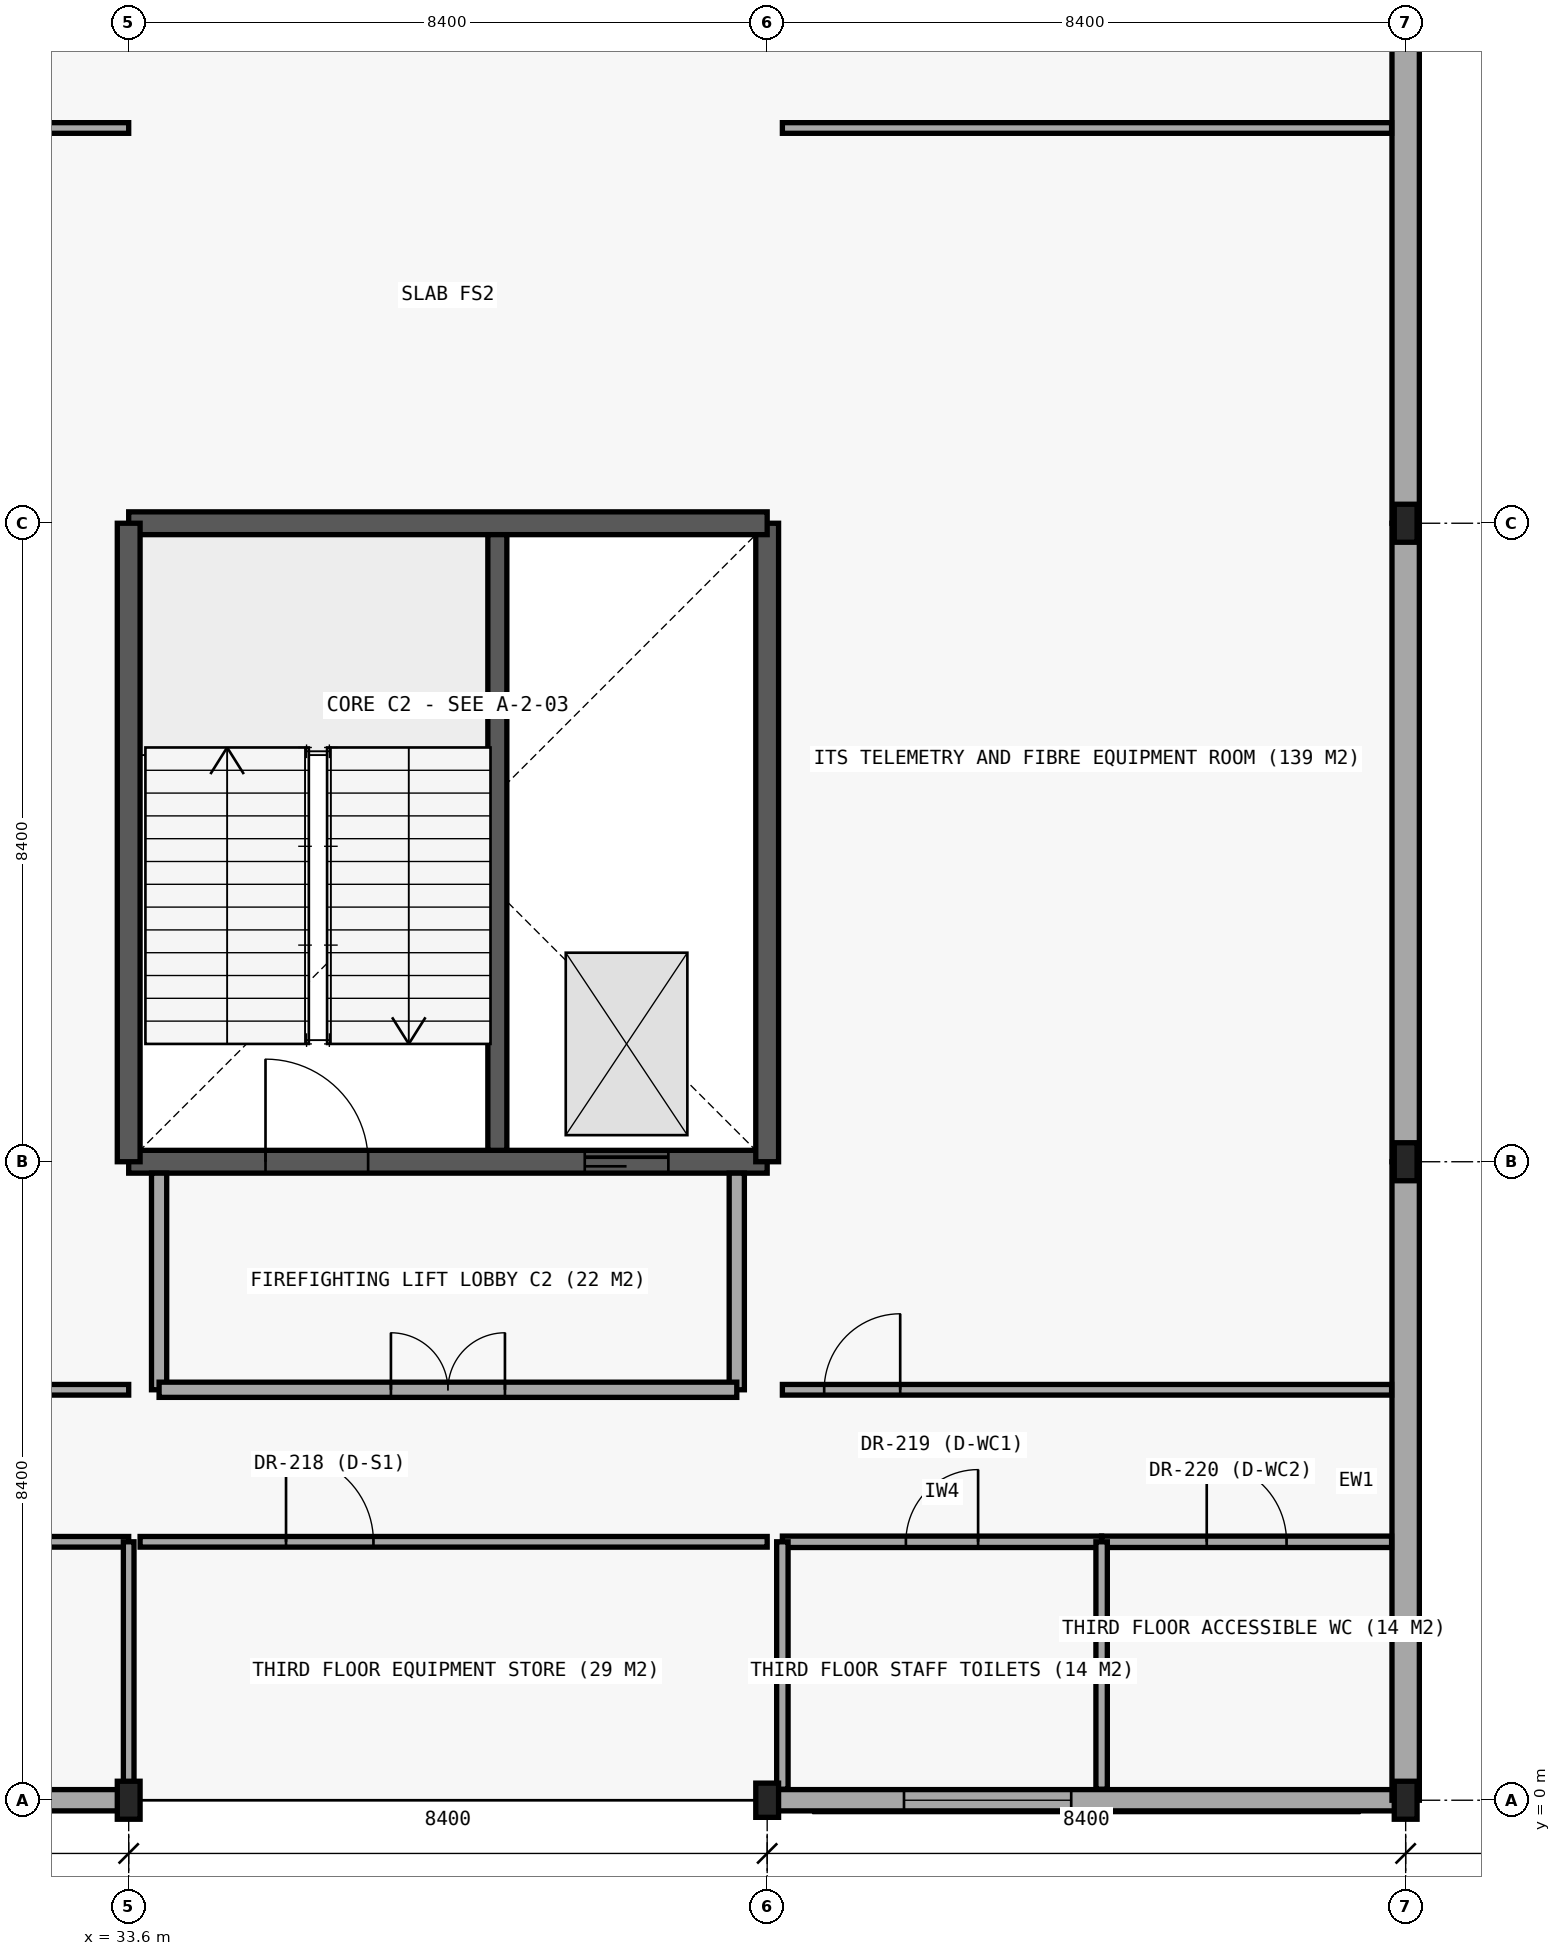
"""IFC4 building model, lengths in metres.
Left out: names, types, materials, properties, quantities, classifications, styles, units other than length and angle.
Written with IfcOpenShell. Run it as: python <this file> out.ifc"""

import sys

from ifc_helpers import new_model, si_unit, direction, frame, frame_2d, origin, origin_2d, place, context, subcontext, project, spatial, rectangle, i_section, extrude, element, fill, save


model = new_model("IFC4")
c1 = context("Model", 3, precision=1e-05, world=origin(), true_north=direction((0.0, 1.0)))
c2 = subcontext(c1, "Body", "Model", "MODEL_VIEW")
j1 = project(units=[si_unit("LENGTHUNIT", "METRE"), si_unit("PLANEANGLEUNIT", "RADIAN")], contexts=[c1])
p1 = place(None, origin())
s1 = spatial("IfcSite", under=j1, at=p1, CompositionType="ELEMENT")
p2 = place(p1, origin())
s2 = spatial("IfcBuilding", under=s1, at=p2, CompositionType="ELEMENT")
p3 = place(p2, frame((0.0, 0.0, 13.2)))
s3 = spatial("IfcBuildingStorey", under=s2, at=p3, CompositionType="ELEMENT", Elevation=13.2)
p4 = place(p3, frame((33.6, 8.4, 0.0), z_axis=(0.0, 0.0, 1.0), x_axis=(1.0, 0.0, 0.0)))
e1 = element("IfcWall", 1, at=p4, inside=s3, PredefinedType="SHEAR", context=c2, shape_type="SweptSolid", body=[
    extrude(rectangle(XDim=8.4, YDim=0.3, at=frame_2d((4.2, 0.0))), origin(), (0.0, 0.0, 1.0), 4.2),
])
p5 = place(p4, frame((1.8, 0.0, 0.0)))
e2 = element("IfcOpeningElement", 2, at=p5, cuts=e1, PredefinedType="OPENING", context=c2, shape_type="SweptSolid", body=[
    extrude(rectangle(XDim=1.35, YDim=2.2, at=frame_2d((0.675, 1.1))), frame((0.0, 0.16, 0.0), z_axis=(0.0, -1.0, 0.0), x_axis=(1.0, 0.0, 0.0)), (0.0, 0.0, 1.0), 0.32),
])
p6 = place(p4, frame((6.0, 0.0, 0.0)))
e3 = element("IfcOpeningElement", 3, at=p6, cuts=e1, PredefinedType="OPENING", context=c2, shape_type="SweptSolid", body=[
    extrude(rectangle(XDim=1.1, YDim=2.2, at=frame_2d((0.55, 1.1))), frame((0.0, 0.16, 0.0), z_axis=(0.0, -1.0, 0.0), x_axis=(1.0, 0.0, 0.0)), (0.0, 0.0, 1.0), 0.32),
])
p7 = place(p3, frame((42.0, 8.4, 0.0), z_axis=(0.0, 0.0, 1.0), x_axis=(0.0, 1.0, 0.0)))
e4 = element("IfcWall", 4, at=p7, inside=s3, PredefinedType="SHEAR", context=c2, shape_type="SweptSolid", body=[
    extrude(rectangle(XDim=8.4, YDim=0.3, at=frame_2d((4.2, 0.0))), origin(), (0.0, 0.0, 1.0), 4.2),
])
p8 = place(p3, frame((42.0, 16.8, 0.0), z_axis=(0.0, 0.0, 1.0), x_axis=(-1.0, 0.0, 0.0)))
e5 = element("IfcWall", 5, at=p8, inside=s3, PredefinedType="SHEAR", context=c2, shape_type="SweptSolid", body=[
    extrude(rectangle(XDim=8.4, YDim=0.3, at=frame_2d((4.2, 0.0))), origin(), (0.0, 0.0, 1.0), 4.2),
])
p9 = place(p3, frame((33.6, 16.8, 0.0), z_axis=(0.0, 0.0, 1.0), x_axis=(0.0, -1.0, 0.0)))
e6 = element("IfcWall", 6, at=p9, inside=s3, PredefinedType="SHEAR", context=c2, shape_type="SweptSolid", body=[
    extrude(rectangle(XDim=8.4, YDim=0.3, at=frame_2d((4.2, 0.0))), origin(), (0.0, 0.0, 1.0), 4.2),
])
p10 = place(p3, frame((38.45, 8.55, 0.0), z_axis=(0.0, 0.0, 1.0), x_axis=(0.0, 1.0, 0.0)))
e7 = element("IfcWall", 7, at=p10, inside=s3, PredefinedType="SHEAR", context=c2, shape_type="SweptSolid", body=[
    extrude(rectangle(XDim=8.1, YDim=0.25, at=frame_2d((4.05, 0.0))), origin(), (0.0, 0.0, 1.0), 4.2),
])
p11 = place(p3, frame((33.6, 0.0, 0.0), z_axis=(0.0, 0.0, 1.0), x_axis=(1.0, 0.0, 0.0)))
e8 = element("IfcColumn", 8, at=p11, inside=s3, PredefinedType="COLUMN", context=c2, shape_type="SweptSolid", body=[
    extrude(i_section(OverallWidth=0.3, OverallDepth=0.5, WebThickness=0.014, FlangeThickness=0.028, FilletRadius=0.027, at=origin_2d()), origin(), (0.0, 0.0, 1.0), 4.2),
])
p12 = place(p3, frame((42.0, 0.0, 0.0), z_axis=(0.0, 0.0, 1.0), x_axis=(1.0, 0.0, 0.0)))
e9 = element("IfcColumn", 9, at=p12, inside=s3, PredefinedType="COLUMN", context=c2, shape_type="SweptSolid", body=[
    extrude(i_section(OverallWidth=0.3, OverallDepth=0.45, WebThickness=0.014, FlangeThickness=0.026, FilletRadius=0.027, at=origin_2d()), origin(), (0.0, 0.0, 1.0), 4.2),
])
for number, where, z_axis, x_axis in (
    (10, (50.4, 0.0, 0.0), (0.0, 0.0, 1.0), (1.0, 0.0, 0.0)),
    (11, (50.4, 8.4, 0.0), (0.0, 0.0, 1.0), (1.0, 0.0, 0.0)),
    (12, (50.4, 16.8, 0.0), (0.0, 0.0, 1.0), (1.0, 0.0, 0.0)),
):
    element("IfcColumn", number, at=place(p3, frame(where, z_axis=z_axis, x_axis=x_axis)), inside=s3, PredefinedType="COLUMN", context=c2, shape_type="SweptSolid", body=[
        extrude(i_section(OverallWidth=0.3, OverallDepth=0.5, WebThickness=0.014, FlangeThickness=0.028, FilletRadius=0.027, at=origin_2d()), origin(), (0.0, 0.0, 1.0), 4.2),
    ])
p13 = place(p3, frame((25.2, 0.0, 0.0), z_axis=(0.0, 0.0, 1.0), x_axis=(1.0, 0.0, 0.0)))
e13 = element("IfcWall", 13, at=p13, inside=s3, PredefinedType="STANDARD", context=c2, shape_type="SweptSolid", body=[
    extrude(rectangle(XDim=8.4, YDim=0.28, at=frame_2d((4.2, 0.0))), origin(), (0.0, 0.0, 1.0), 3.62),
])
p14 = place(p3, frame((42.0, 0.0, 0.0), z_axis=(0.0, 0.0, 1.0), x_axis=(1.0, 0.0, 0.0)))
e14 = element("IfcWall", 14, at=p14, inside=s3, PredefinedType="STANDARD", context=c2, shape_type="SweptSolid", body=[
    extrude(rectangle(XDim=8.4, YDim=0.28, at=frame_2d((4.2, 0.0))), origin(), (0.0, 0.0, 1.0), 3.62),
])
p15 = place(p14, frame((1.8, 0.0, 0.85)))
e15 = element("IfcOpeningElement", 15, at=p15, cuts=e14, PredefinedType="OPENING", context=c2, shape_type="SweptSolid", body=[
    extrude(rectangle(XDim=2.2, YDim=2.5, at=frame_2d((1.1, 1.25))), frame((0.0, 0.15, 0.0), z_axis=(0.0, -1.0, 0.0), x_axis=(1.0, 0.0, 0.0)), (0.0, 0.0, 1.0), 0.3),
])
p16 = place(p3, frame((50.4, 0.0, 0.0), z_axis=(0.0, 0.0, 1.0), x_axis=(0.0, 1.0, 0.0)))
e16 = element("IfcWall", 16, at=p16, inside=s3, PredefinedType="STANDARD", context=c2, shape_type="SweptSolid", body=[
    extrude(rectangle(XDim=8.4, YDim=0.36, at=frame_2d((4.2, 0.0))), origin(), (0.0, 0.0, 1.0), 3.62),
])
p17 = place(p3, frame((50.4, 8.4, 0.0), z_axis=(0.0, 0.0, 1.0), x_axis=(0.0, 1.0, 0.0)))
e17 = element("IfcWall", 17, at=p17, inside=s3, PredefinedType="STANDARD", context=c2, shape_type="SweptSolid", body=[
    extrude(rectangle(XDim=8.4, YDim=0.36, at=frame_2d((4.2, 0.0))), origin(), (0.0, 0.0, 1.0), 3.62),
])
p18 = place(p3, frame((50.4, 16.8, 0.0), z_axis=(0.0, 0.0, 1.0), x_axis=(0.0, 1.0, 0.0)))
e18 = element("IfcWall", 18, at=p18, inside=s3, PredefinedType="STANDARD", context=c2, shape_type="SweptSolid", body=[
    extrude(rectangle(XDim=8.4, YDim=0.36, at=frame_2d((4.2, 0.0))), origin(), (0.0, 0.0, 1.0), 3.62),
])
for number, where, z_axis, x_axis in (
    (19, (34.0, 5.4, 0.0), (0.0, 0.0, 1.0), (0.0, 1.0, 0.0)),
    (20, (41.6, 5.4, 0.0), (0.0, 0.0, 1.0), (0.0, 1.0, 0.0)),
):
    element("IfcWall", number, at=place(p3, frame(where, z_axis=z_axis, x_axis=x_axis)), inside=s3, PredefinedType="PARTITIONING", context=c2, shape_type="SweptSolid", body=[
        extrude(rectangle(XDim=2.85, YDim=0.2, at=frame_2d((1.425, 0.0))), origin(), (0.0, 0.0, 1.0), 3.49),
    ])
p19 = place(p3, frame((34.0, 5.4, 0.0), z_axis=(0.0, 0.0, 1.0), x_axis=(1.0, 0.0, 0.0)))
e21 = element("IfcWall", 21, at=p19, inside=s3, PredefinedType="PARTITIONING", context=c2, shape_type="SweptSolid", body=[
    extrude(rectangle(XDim=7.6, YDim=0.2, at=frame_2d((3.8, 0.0))), origin(), (0.0, 0.0, 1.0), 3.52),
])
p20 = place(p19, frame((3.05, 0.0, 0.0)))
e22 = element("IfcOpeningElement", 22, at=p20, cuts=e21, PredefinedType="OPENING", context=c2, shape_type="SweptSolid", body=[
    extrude(rectangle(XDim=1.5, YDim=2.2, at=frame_2d((0.75, 1.1))), frame((0.0, 0.11, 0.0), z_axis=(0.0, -1.0, 0.0), x_axis=(1.0, 0.0, 0.0)), (0.0, 0.0, 1.0), 0.22),
])
p21 = place(p3, frame((19.8, 3.4, 0.0), z_axis=(0.0, 0.0, 1.0), x_axis=(1.0, 0.0, 0.0)))
e23 = element("IfcWall", 23, at=p21, inside=s3, PredefinedType="PARTITIONING", context=c2, shape_type="SweptSolid", body=[
    extrude(rectangle(XDim=13.8, YDim=0.14, at=frame_2d((6.9, 0.0))), origin(), (0.0, 0.0, 1.0), 3.5),
])
p22 = place(p21, frame((6.4, 0.0, 0.0)))
e24 = element("IfcOpeningElement", 24, at=p22, cuts=e23, PredefinedType="OPENING", context=c2, shape_type="SweptSolid", body=[
    extrude(rectangle(XDim=1.0, YDim=2.15, at=frame_2d((0.5, 1.075))), frame((0.0, 0.08, 0.0), z_axis=(0.0, -1.0, 0.0), x_axis=(1.0, 0.0, 0.0)), (0.0, 0.0, 1.0), 0.16),
])
p23 = place(p3, frame((33.75, 3.4, 0.0), z_axis=(0.0, 0.0, 1.0), x_axis=(1.0, 0.0, 0.0)))
e25 = element("IfcWall", 25, at=p23, inside=s3, PredefinedType="PARTITIONING", context=c2, shape_type="SweptSolid", body=[
    extrude(rectangle(XDim=8.25, YDim=0.14, at=frame_2d((4.125, 0.0))), origin(), (0.0, 0.0, 1.0), 3.5),
])
p24 = place(p23, frame((1.92, 0.0, 0.0)))
e26 = element("IfcOpeningElement", 26, at=p24, cuts=e25, PredefinedType="OPENING", context=c2, shape_type="SweptSolid", body=[
    extrude(rectangle(XDim=1.15, YDim=2.15, at=frame_2d((0.575, 1.075))), frame((0.0, 0.08, 0.0), z_axis=(0.0, -1.0, 0.0), x_axis=(1.0, 0.0, 0.0)), (0.0, 0.0, 1.0), 0.16),
])
p25 = place(p3, frame((42.2, 3.4, 0.0), z_axis=(0.0, 0.0, 1.0), x_axis=(1.0, 0.0, 0.0)))
e27 = element("IfcWall", 27, at=p25, inside=s3, PredefinedType="PARTITIONING", context=c2, shape_type="SweptSolid", body=[
    extrude(rectangle(XDim=4.2, YDim=0.15, at=frame_2d((2.1, 0.0))), origin(), (0.0, 0.0, 1.0), 3.5),
])
p26 = place(p25, frame((1.625, 0.0, 0.0)))
e28 = element("IfcOpeningElement", 28, at=p26, cuts=e27, PredefinedType="OPENING", context=c2, shape_type="SweptSolid", body=[
    extrude(rectangle(XDim=0.95, YDim=2.1, at=frame_2d((0.475, 1.05))), frame((0.0, 0.085, 0.0), z_axis=(0.0, -1.0, 0.0), x_axis=(1.0, 0.0, 0.0)), (0.0, 0.0, 1.0), 0.17),
])
p27 = place(p3, frame((46.4, 3.4, 0.0), z_axis=(0.0, 0.0, 1.0), x_axis=(1.0, 0.0, 0.0)))
e29 = element("IfcWall", 29, at=p27, inside=s3, PredefinedType="PARTITIONING", context=c2, shape_type="SweptSolid", body=[
    extrude(rectangle(XDim=3.815, YDim=0.15, at=frame_2d((1.908, 0.0))), origin(), (0.0, 0.0, 1.0), 3.5),
])
p28 = place(p27, frame((1.383, 0.0, 0.0)))
e30 = element("IfcOpeningElement", 30, at=p28, cuts=e29, PredefinedType="OPENING", context=c2, shape_type="SweptSolid", body=[
    extrude(rectangle(XDim=1.05, YDim=2.15, at=frame_2d((0.525, 1.075))), frame((0.0, 0.085, 0.0), z_axis=(0.0, -1.0, 0.0), x_axis=(1.0, 0.0, 0.0)), (0.0, 0.0, 1.0), 0.17),
])
p29 = place(p3, frame((22.2, 5.4, 0.0), z_axis=(0.0, 0.0, 1.0), x_axis=(1.0, 0.0, 0.0)))
e31 = element("IfcWall", 31, at=p29, inside=s3, PredefinedType="PARTITIONING", context=c2, shape_type="SweptSolid", body=[
    extrude(rectangle(XDim=11.4, YDim=0.14, at=frame_2d((5.7, 0.0))), origin(), (0.0, 0.0, 1.0), 3.5),
])
p30 = place(p3, frame((42.2, 5.4, 0.0), z_axis=(0.0, 0.0, 1.0), x_axis=(1.0, 0.0, 0.0)))
e32 = element("IfcWall", 32, at=p30, inside=s3, PredefinedType="PARTITIONING", context=c2, shape_type="SweptSolid", body=[
    extrude(rectangle(XDim=8.015, YDim=0.14, at=frame_2d((4.008, 0.0))), origin(), (0.0, 0.0, 1.0), 3.5),
])
p31 = place(p30, frame((0.55, 0.0, 0.0)))
e33 = element("IfcOpeningElement", 33, at=p31, cuts=e32, PredefinedType="OPENING", context=c2, shape_type="SweptSolid", body=[
    extrude(rectangle(XDim=1.0, YDim=2.15, at=frame_2d((0.5, 1.075))), frame((0.0, 0.08, 0.0), z_axis=(0.0, -1.0, 0.0), x_axis=(1.0, 0.0, 0.0)), (0.0, 0.0, 1.0), 0.16),
])
p32 = place(p3, frame((31.0, 22.0, 0.0), z_axis=(0.0, 0.0, 1.0), x_axis=(1.0, 0.0, 0.0)))
e34 = element("IfcWall", 34, at=p32, inside=s3, PredefinedType="PARTITIONING", context=c2, shape_type="SweptSolid", body=[
    extrude(rectangle(XDim=2.6, YDim=0.14, at=frame_2d((1.3, 0.0))), origin(), (0.0, 0.0, 1.0), 3.5),
])
p33 = place(p3, frame((42.2, 22.0, 0.0), z_axis=(0.0, 0.0, 1.0), x_axis=(1.0, 0.0, 0.0)))
e35 = element("IfcWall", 35, at=p33, inside=s3, PredefinedType="PARTITIONING", context=c2, shape_type="SweptSolid", body=[
    extrude(rectangle(XDim=8.015, YDim=0.14, at=frame_2d((4.008, 0.0))), origin(), (0.0, 0.0, 1.0), 3.5),
])
p34 = place(p3, frame((33.6, 0.145, 0.0), z_axis=(0.0, 0.0, 1.0), x_axis=(0.0, 1.0, 0.0)))
e36 = element("IfcWall", 36, at=p34, inside=s3, PredefinedType="PARTITIONING", context=c2, shape_type="SweptSolid", body=[
    extrude(rectangle(XDim=3.255, YDim=0.14, at=frame_2d((1.627, 0.0))), origin(), (0.0, 0.0, 1.0), 3.49),
])
p35 = place(p3, frame((42.2, 0.145, 0.0), z_axis=(0.0, 0.0, 1.0), x_axis=(0.0, 1.0, 0.0)))
e37 = element("IfcWall", 37, at=p35, inside=s3, PredefinedType="PARTITIONING", context=c2, shape_type="SweptSolid", body=[
    extrude(rectangle(XDim=3.255, YDim=0.15, at=frame_2d((1.627, 0.0))), origin(), (0.0, 0.0, 1.0), 3.49),
])
p36 = place(p3, frame((46.4, 0.145, 0.0), z_axis=(0.0, 0.0, 1.0), x_axis=(0.0, 1.0, 0.0)))
e38 = element("IfcWall", 38, at=p36, inside=s3, PredefinedType="PARTITIONING", context=c2, shape_type="SweptSolid", body=[
    extrude(rectangle(XDim=3.255, YDim=0.15, at=frame_2d((1.627, 0.0))), origin(), (0.0, 0.0, 1.0), 3.5),
])
p37 = place(p15, origin())
e39 = element("IfcWindow", 39, at=p37, inside=s3, PartitioningType="SINGLE_PANEL", PredefinedType="WINDOW", context=c2, shape_type="SweptSolid", body=[
    extrude(rectangle(XDim=2.2, YDim=2.5, at=frame_2d((1.1, 1.25))), frame((0.0, 0.03, 0.0), z_axis=(0.0, -1.0, 0.0), x_axis=(1.0, 0.0, 0.0)), (0.0, 0.0, 1.0), 0.06),
])
fill(e15, e39)
p38 = place(p5, origin())
e40 = element("IfcDoor", 40, at=p38, inside=s3, OperationType="SINGLE_SWING_LEFT", PredefinedType="DOOR", context=c2, shape_type="SweptSolid", body=[
    extrude(rectangle(XDim=1.35, YDim=2.2, at=frame_2d((0.675, 1.1))), frame((0.0, 0.025, 0.0), z_axis=(0.0, -1.0, 0.0), x_axis=(1.0, 0.0, 0.0)), (0.0, 0.0, 1.0), 0.05),
])
fill(e2, e40)
p39 = place(p6, origin())
e41 = element("IfcDoor", 41, at=p39, inside=s3, OperationType="SLIDING_TO_LEFT", PredefinedType="DOOR", context=c2, shape_type="SweptSolid", body=[
    extrude(rectangle(XDim=1.1, YDim=2.2, at=frame_2d((0.55, 1.1))), frame((0.0, 0.025, 0.0), z_axis=(0.0, -1.0, 0.0), x_axis=(1.0, 0.0, 0.0)), (0.0, 0.0, 1.0), 0.05),
])
fill(e3, e41)
p40 = place(p20, origin())
e42 = element("IfcDoor", 42, at=p40, inside=s3, OperationType="DOUBLE_DOOR_SINGLE_SWING", PredefinedType="DOOR", context=c2, shape_type="SweptSolid", body=[
    extrude(rectangle(XDim=1.5, YDim=2.2, at=frame_2d((0.75, 1.1))), frame((0.0, 0.025, 0.0), z_axis=(0.0, -1.0, 0.0), x_axis=(1.0, 0.0, 0.0)), (0.0, 0.0, 1.0), 0.05),
])
fill(e22, e42)
p41 = place(p24, origin())
e43 = element("IfcDoor", 43, at=p41, inside=s3, OperationType="SINGLE_SWING_LEFT", PredefinedType="DOOR", context=c2, shape_type="SweptSolid", body=[
    extrude(rectangle(XDim=1.15, YDim=2.15, at=frame_2d((0.575, 1.075))), frame((0.0, 0.025, 0.0), z_axis=(0.0, -1.0, 0.0), x_axis=(1.0, 0.0, 0.0)), (0.0, 0.0, 1.0), 0.05),
])
fill(e26, e43)
p42 = place(p26, origin())
e44 = element("IfcDoor", 44, at=p42, inside=s3, OperationType="SINGLE_SWING_RIGHT", PredefinedType="DOOR", context=c2, shape_type="SweptSolid", body=[
    extrude(rectangle(XDim=0.95, YDim=2.1, at=frame_2d((0.475, 1.05))), frame((0.0, 0.025, 0.0), z_axis=(0.0, -1.0, 0.0), x_axis=(1.0, 0.0, 0.0)), (0.0, 0.0, 1.0), 0.05),
])
fill(e28, e44)
p43 = place(p28, origin())
e45 = element("IfcDoor", 45, at=p43, inside=s3, OperationType="SINGLE_SWING_LEFT", PredefinedType="DOOR", context=c2, shape_type="SweptSolid", body=[
    extrude(rectangle(XDim=1.05, YDim=2.15, at=frame_2d((0.525, 1.075))), frame((0.0, 0.025, 0.0), z_axis=(0.0, -1.0, 0.0), x_axis=(1.0, 0.0, 0.0)), (0.0, 0.0, 1.0), 0.05),
])
fill(e30, e45)
p44 = place(p31, origin())
e46 = element("IfcDoor", 46, at=p44, inside=s3, OperationType="SINGLE_SWING_RIGHT", PredefinedType="DOOR", context=c2, shape_type="SweptSolid", body=[
    extrude(rectangle(XDim=1.0, YDim=2.15, at=frame_2d((0.5, 1.075))), frame((0.0, 0.025, 0.0), z_axis=(0.0, -1.0, 0.0), x_axis=(1.0, 0.0, 0.0)), (0.0, 0.0, 1.0), 0.05),
])
fill(e33, e46)
save(model, sys.argv[1])
